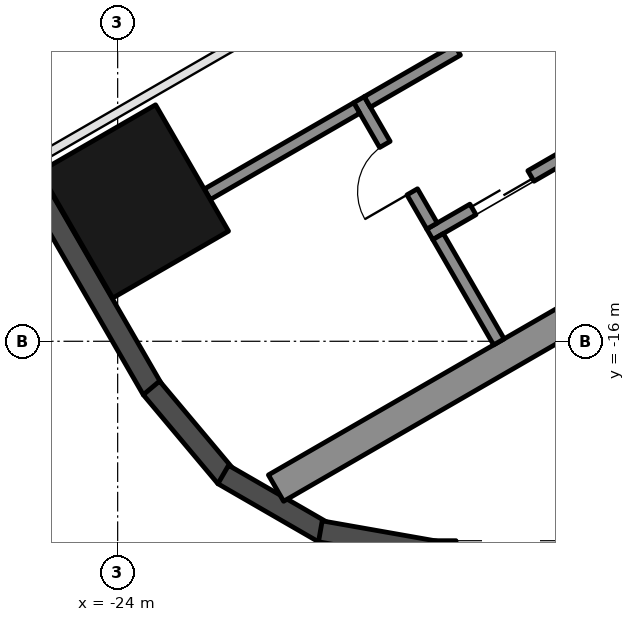
"""IFC4 building model, lengths in metres.
Left out: names, types, materials, properties, quantities, classifications, styles, units other than length and angle.
Written with IfcOpenShell. Run it as: python <this file> out.ifc"""

import sys

from ifc_helpers import new_model, si_unit, direction, frame, frame_2d, origin, origin_2d, place, context, subcontext, project, spatial, rectangle, hollow_rectangle, extrude, element, fill, save


model = new_model("IFC4")
c1 = context("Model", 3, precision=1e-05, world=origin(), true_north=direction((0.0, 1.0)))
c2 = subcontext(c1, "Body", "Model", "MODEL_VIEW")
j1 = project(units=[si_unit("LENGTHUNIT", "METRE"), si_unit("PLANEANGLEUNIT", "RADIAN")], contexts=[c1])
p1 = place(None, origin())
s1 = spatial("IfcSite", under=j1, at=p1, CompositionType="ELEMENT")
p2 = place(p1, origin())
s2 = spatial("IfcBuilding", under=s1, at=p2, CompositionType="ELEMENT")
p3 = place(p2, frame((0.0, 0.0, 165.1)))
s3 = spatial("IfcBuildingStorey", under=s2, at=p3, CompositionType="ELEMENT", Elevation=165.1)
p4 = place(p3, frame((-23.729, -13.7, 0.0), z_axis=(0.0, 0.0, 1.0), x_axis=(-0.5, 0.866025403784, 0.0)))
e1 = element("IfcColumn", 1, at=p4, inside=s3, PredefinedType="COLUMN", context=c2, shape_type="SweptSolid", body=[
    extrude(hollow_rectangle(XDim=2.4, YDim=2.2, WallThickness=0.06, at=origin_2d()), origin(), (0.0, 0.0, 1.0), 3.7),
])
p5 = place(p3, frame((-26.257, -11.893, 0.0), z_axis=(0.0, 0.0, 1.0), x_axis=(0.500018773155, -0.866014564827, 0.0)))
e2 = element("IfcWall", 2, at=p5, inside=s3, PredefinedType="SOLIDWALL", context=c2, shape_type="SweptSolid", body=[
    extrude(rectangle(XDim=5.658, YDim=0.35, at=frame_2d((2.829, 0.0))), origin(), (0.0, 0.0, 1.0), 3.55),
])
for number, where, z_axis, x_axis in (
    (3, (-23.445, -16.768, 0.0), (0.0, 0.0, 1.0), (0.643, -0.766, 0.0)),
    (4, (-22.264, -18.192, 0.0), (0.0, 0.0, 1.0), (0.866, -0.5, 0.0)),
):
    element("IfcWall", number, at=place(p3, frame(where, z_axis=z_axis, x_axis=x_axis)), inside=s3, PredefinedType="SOLIDWALL", context=c2, shape_type="SweptSolid", body=[
        extrude(rectangle(XDim=1.91, YDim=0.35, at=frame_2d((0.955, 0.0))), origin(), (0.0, 0.0, 1.0), 3.55),
    ])
p6 = place(p3, frame((-20.667, -19.126, 0.0), z_axis=(0.0, 0.0, 1.0), x_axis=(0.984798995425, -0.173697837091, 0.0)))
e5 = element("IfcWall", 5, at=p6, inside=s3, PredefinedType="SOLIDWALL", context=c2, shape_type="SweptSolid", body=[
    extrude(rectangle(XDim=1.91, YDim=0.35, at=frame_2d((0.955, 0.0))), origin(), (0.0, 0.0, 1.0), 3.55),
])
p7 = place(p3, frame((-18.816, -19.455, 0.0), z_axis=(0.0, 0.0, 1.0), x_axis=(1.0, 0.0, 0.0)))
e6 = element("IfcWall", 6, at=p7, inside=s3, PredefinedType="SOLIDWALL", context=c2, shape_type="SweptSolid", body=[
    extrude(rectangle(XDim=11.816, YDim=0.35, at=frame_2d((5.908, 0.0))), origin(), (0.0, 0.0, 1.0), 3.55),
])
p8 = place(p7, frame((0.381, 0.0, 0.3)))
e7 = element("IfcOpeningElement", 7, at=p8, cuts=e6, PredefinedType="OPENING", context=c2, shape_type="SweptSolid", body=[
    extrude(rectangle(XDim=1.8, YDim=2.65, at=frame_2d((0.9, 1.325))), frame((0.0, 0.185, 0.0), z_axis=(0.0, -1.0, 0.0), x_axis=(1.0, 0.0, 0.0)), (0.0, 0.0, 1.0), 0.37),
])
p9 = place(p7, frame((7.74, 0.0, 0.0)))
e8 = element("IfcOpeningElement", 8, at=p9, cuts=e6, PredefinedType="OPENING", context=c2, shape_type="SweptSolid", body=[
    extrude(rectangle(XDim=2.4, YDim=2.4, at=frame_2d((1.2, 1.2))), frame((0.0, 0.185, 0.0), z_axis=(0.0, -1.0, 0.0), x_axis=(1.0, 0.0, 0.0)), (0.0, 0.0, 1.0), 0.37),
])
p10 = place(p7, frame((3.791, 0.0, 0.3)))
e9 = element("IfcOpeningElement", 9, at=p10, cuts=e6, PredefinedType="OPENING", context=c2, shape_type="SweptSolid", body=[
    extrude(rectangle(XDim=1.6, YDim=2.65, at=frame_2d((0.8, 1.325))), frame((0.0, 0.185, 0.0), z_axis=(0.0, -1.0, 0.0), x_axis=(1.0, 0.0, 0.0)), (0.0, 0.0, 1.0), 0.37),
])
p11 = place(p7, frame((5.691, 0.0, 0.3)))
e10 = element("IfcOpeningElement", 10, at=p11, cuts=e6, PredefinedType="OPENING", context=c2, shape_type="SweptSolid", body=[
    extrude(rectangle(XDim=1.6, YDim=2.65, at=frame_2d((0.8, 1.325))), frame((0.0, 0.185, 0.0), z_axis=(0.0, -1.0, 0.0), x_axis=(1.0, 0.0, 0.0)), (0.0, 0.0, 1.0), 0.37),
])
p12 = place(p3, frame((-8.547, -10.997, 0.0), z_axis=(0.0, 0.0, 1.0), x_axis=(-0.866025009528, -0.500000682871, 0.0)))
e11 = element("IfcWall", 11, at=p12, inside=s3, PredefinedType="SHEAR", context=c2, shape_type="SweptSolid", body=[
    extrude(rectangle(XDim=14.837, YDim=0.5, at=frame_2d((7.418, 0.0))), origin(), (0.0, 0.0, 1.0), 3.5),
])
p13 = place(p3, frame((-10.068, -9.162, 0.0), z_axis=(0.0, 0.0, 1.0), x_axis=(-0.866032725843, -0.499987317609, 0.0)))
e12 = element("IfcWall", 12, at=p13, inside=s3, PredefinedType="SHEAR", context=c2, shape_type="SweptSolid", body=[
    extrude(rectangle(XDim=10.16, YDim=0.2, at=frame_2d((5.08, 0.0))), origin(), (0.0, 0.0, 1.0), 3.5),
])
p14 = place(p13, frame((0.62, 0.0, 0.0)))
e13 = element("IfcOpeningElement", 13, at=p14, cuts=e12, PredefinedType="OPENING", context=c2, shape_type="SweptSolid", body=[
    extrude(rectangle(XDim=1.1, YDim=2.1, at=frame_2d((0.55, 1.05))), frame((0.0, 0.11, 0.0), z_axis=(0.0, -1.0, 0.0), x_axis=(1.0, 0.0, 0.0)), (0.0, 0.0, 1.0), 0.22),
])
p15 = place(p13, frame((3.16, 0.0, 0.0)))
e14 = element("IfcOpeningElement", 14, at=p15, cuts=e12, PredefinedType="OPENING", context=c2, shape_type="SweptSolid", body=[
    extrude(rectangle(XDim=1.1, YDim=2.1, at=frame_2d((0.55, 1.05))), frame((0.0, 0.11, 0.0), z_axis=(0.0, -1.0, 0.0), x_axis=(1.0, 0.0, 0.0)), (0.0, 0.0, 1.0), 0.22),
])
p16 = place(p13, frame((5.7, 0.0, 0.0)))
e15 = element("IfcOpeningElement", 15, at=p16, cuts=e12, PredefinedType="OPENING", context=c2, shape_type="SweptSolid", body=[
    extrude(rectangle(XDim=1.1, YDim=2.1, at=frame_2d((0.55, 1.05))), frame((0.0, 0.11, 0.0), z_axis=(0.0, -1.0, 0.0), x_axis=(1.0, 0.0, 0.0)), (0.0, 0.0, 1.0), 0.22),
])
p17 = place(p13, frame((8.24, 0.0, 0.0)))
e16 = element("IfcOpeningElement", 16, at=p17, cuts=e12, PredefinedType="OPENING", context=c2, shape_type="SweptSolid", body=[
    extrude(rectangle(XDim=1.1, YDim=2.1, at=frame_2d((0.55, 1.05))), frame((0.0, 0.11, 0.0), z_axis=(0.0, -1.0, 0.0), x_axis=(1.0, 0.0, 0.0)), (0.0, 0.0, 1.0), 0.22),
])
p18 = place(p3, frame((-20.031, -12.026, 0.0), z_axis=(0.0, 0.0, 1.0), x_axis=(0.500033551112, -0.866006032174, 0.0)))
e17 = element("IfcWall", 17, at=p18, inside=s3, PredefinedType="SHEAR", context=c2, shape_type="SweptSolid", body=[
    extrude(rectangle(XDim=2.4, YDim=0.2, at=frame_2d((1.2, 0.0))), origin(), (0.0, 0.0, 1.0), 3.5),
])
p19 = place(p18, frame((0.85, 0.0, 0.0)))
e18 = element("IfcOpeningElement", 18, at=p19, cuts=e17, PredefinedType="OPENING", context=c2, shape_type="SweptSolid", body=[
    extrude(rectangle(XDim=0.9, YDim=2.1, at=frame_2d((0.45, 1.05))), frame((0.0, 0.11, 0.0), z_axis=(0.0, -1.0, 0.0), x_axis=(1.0, 0.0, 0.0)), (0.0, 0.0, 1.0), 0.22),
])
p20 = place(p3, frame((-18.413, -11.208, 0.0), z_axis=(0.0, 0.0, 1.0), x_axis=(-0.866038183914, -0.499977863513, 0.0)))
e19 = element("IfcWall", 19, at=p20, inside=s3, PredefinedType="SHEAR", context=c2, shape_type="SweptSolid", body=[
    extrude(rectangle(XDim=1.71, YDim=0.2, at=frame_2d((0.855, 0.0))), origin(), (0.0, 0.0, 1.0), 3.5),
])
p21 = place(p3, frame((-18.73, -14.278, 0.0), z_axis=(0.0, 0.0, 1.0), x_axis=(0.50002537861, -0.866010750942, 0.0)))
e20 = element("IfcWall", 20, at=p21, inside=s3, PredefinedType="SHEAR", context=c2, shape_type="SweptSolid", body=[
    extrude(rectangle(XDim=2.0, YDim=0.2, at=frame_2d((1.0, 0.0))), origin(), (0.0, 0.0, 1.0), 3.5),
])
p22 = place(p3, frame((-20.067, -12.163, 0.0), z_axis=(0.0, 0.0, 1.0), x_axis=(-0.866055327414, -0.49994816717, 0.0)))
e21 = element("IfcWall", 21, at=p22, inside=s3, PredefinedType="SHEAR", context=c2, shape_type="SweptSolid", body=[
    extrude(rectangle(XDim=2.84, YDim=0.2, at=frame_2d((1.42, 0.0))), origin(), (0.0, 0.0, 1.0), 3.5),
])
p23 = place(p3, frame((-19.363, -9.562, 0.0), z_axis=(0.0, 0.0, 1.0), x_axis=(-0.866016523273, -0.500015381182, 0.0)))
e22 = element("IfcWall", 22, at=p23, inside=s3, PredefinedType="PARTITIONING", context=c2, shape_type="SweptSolid", body=[
    extrude(rectangle(XDim=6.95, YDim=0.15, at=frame_2d((3.475, 0.0))), origin(), (0.0, 0.0, 1.0), 3.5),
])
p24 = place(p17, origin())
e23 = element("IfcDoor", 23, at=p24, inside=s3, OperationType="DOUBLE_DOOR_SLIDING", PredefinedType="DOOR", context=c2, shape_type="SweptSolid", body=[
    extrude(rectangle(XDim=1.1, YDim=2.1, at=frame_2d((0.55, 1.05))), frame((0.0, 0.025, 0.0), z_axis=(0.0, -1.0, 0.0), x_axis=(1.0, 0.0, 0.0)), (0.0, 0.0, 1.0), 0.05),
])
fill(e16, e23)
p25 = place(p19, frame((0.9, 0.0, 0.0), z_axis=(0.0, 0.0, 1.0), x_axis=(-1.0, 0.0, 0.0)))
e24 = element("IfcDoor", 24, at=p25, inside=s3, OperationType="SINGLE_SWING_LEFT", PredefinedType="DOOR", context=c2, shape_type="SweptSolid", body=[
    extrude(rectangle(XDim=0.9, YDim=2.1, at=frame_2d((0.45, 1.05))), frame((0.0, 0.025, 0.0), z_axis=(0.0, -1.0, 0.0), x_axis=(1.0, 0.0, 0.0)), (0.0, 0.0, 1.0), 0.05),
])
fill(e18, e24)
save(model, sys.argv[1])
